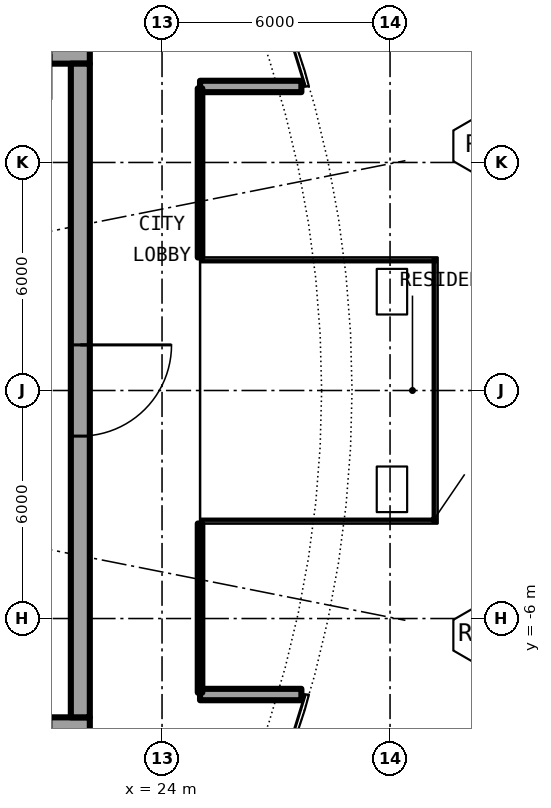
"""IFC4 building model, lengths in metres.
Left out: names, types, materials, properties, quantities, classifications, styles, units other than length and angle.
Written with IfcOpenShell. Run it as: python <this file> out.ifc"""

import sys

from ifc_helpers import new_model, si_unit, direction, frame, frame_2d, origin, place, context, subcontext, project, spatial, rectangle, extrude, element, fill, save


model = new_model("IFC4")
c1 = context("Model", 3, precision=1e-05, world=origin(), true_north=direction((0.0, 1.0)))
c2 = subcontext(c1, "Body", "Model", "MODEL_VIEW")
j1 = project(units=[si_unit("LENGTHUNIT", "METRE"), si_unit("PLANEANGLEUNIT", "RADIAN")], contexts=[c1])
p1 = place(None, origin())
s1 = spatial("IfcSite", under=j1, at=p1, CompositionType="ELEMENT")
p2 = place(p1, origin())
s2 = spatial("IfcBuilding", under=s1, at=p2, CompositionType="ELEMENT")
p3 = place(p2, frame((0.0, 0.0, 179.9)))
s3 = spatial("IfcBuildingStorey", under=s2, at=p3, CompositionType="ELEMENT", Elevation=179.9)
for number, where, z_axis, x_axis in (
    (1, (25.0, 8.0, 0.0), (0.0, 0.0, 1.0), (1.0, 0.0, 0.0)),
    (2, (25.0, -8.0, 0.0), (0.0, 0.0, 1.0), (1.0, 0.0, 0.0)),
):
    element("IfcWall", number, at=place(p3, frame(where, z_axis=z_axis, x_axis=x_axis)), inside=s3, PredefinedType="SOLIDWALL", context=c2, shape_type="SweptSolid", body=[
        extrude(rectangle(XDim=2.667, YDim=0.3, at=frame_2d((1.333, 0.0))), origin(), (0.0, 0.0, 1.0), 5.7),
    ])
p4 = place(p3, frame((22.1, 8.85, 0.0), z_axis=(0.0, 0.0, 1.0), x_axis=(-1.0, 0.0, 0.0)))
e3 = element("IfcWall", 3, at=p4, inside=s3, PredefinedType="SHEAR", context=c2, shape_type="SweptSolid", body=[
    extrude(rectangle(XDim=13.6, YDim=0.5, at=frame_2d((6.8, 0.0))), origin(), (0.0, 0.0, 1.0), 6.1),
])
p5 = place(p4, frame((1.025, 0.0, 0.0)))
e4 = element("IfcOpeningElement", 4, at=p5, cuts=e3, PredefinedType="OPENING", context=c2, shape_type="SweptSolid", body=[
    extrude(rectangle(XDim=1.2, YDim=2.3, at=frame_2d((0.6, 1.15))), frame((0.0, 0.26, 0.0), z_axis=(0.0, -1.0, 0.0), x_axis=(1.0, 0.0, 0.0)), (0.0, 0.0, 1.0), 0.52),
])
p6 = place(p3, frame((8.5, -8.85, 0.0), z_axis=(0.0, 0.0, 1.0), x_axis=(1.0, 0.0, 0.0)))
e5 = element("IfcWall", 5, at=p6, inside=s3, PredefinedType="SHEAR", context=c2, shape_type="SweptSolid", body=[
    extrude(rectangle(XDim=13.6, YDim=0.5, at=frame_2d((6.8, 0.0))), origin(), (0.0, 0.0, 1.0), 6.1),
])
p7 = place(p6, frame((11.375, 0.0, 0.0)))
e6 = element("IfcOpeningElement", 6, at=p7, cuts=e5, PredefinedType="OPENING", context=c2, shape_type="SweptSolid", body=[
    extrude(rectangle(XDim=1.2, YDim=2.3, at=frame_2d((0.6, 1.15))), frame((0.0, 0.26, 0.0), z_axis=(0.0, -1.0, 0.0), x_axis=(1.0, 0.0, 0.0)), (0.0, 0.0, 1.0), 0.52),
])
p8 = place(p3, frame((21.85, 8.6, 0.0), z_axis=(0.0, 0.0, 1.0), x_axis=(0.0, -1.0, 0.0)))
e7 = element("IfcWall", 7, at=p8, inside=s3, PredefinedType="SHEAR", context=c2, shape_type="SweptSolid", body=[
    extrude(rectangle(XDim=17.2, YDim=0.5, at=frame_2d((8.6, 0.0))), origin(), (0.0, 0.0, 1.0), 6.1),
])
p9 = place(p8, frame((7.4, 0.0, 0.0)))
e8 = element("IfcOpeningElement", 8, at=p9, cuts=e7, PredefinedType="OPENING", context=c2, shape_type="SweptSolid", body=[
    extrude(rectangle(XDim=2.4, YDim=2.3, at=frame_2d((1.2, 1.15))), frame((0.0, 0.26, 0.0), z_axis=(0.0, -1.0, 0.0), x_axis=(1.0, 0.0, 0.0)), (0.0, 0.0, 1.0), 0.52),
])
p10 = place(p3, frame((25.0, -3.5, 0.0), z_axis=(0.0, 0.0, 1.0), x_axis=(0.0, -1.0, 0.0)))
e9 = element("IfcWall", 9, at=p10, inside=s3, PredefinedType="PARTITIONING", context=c2, shape_type="SweptSolid", body=[
    extrude(rectangle(XDim=4.45, YDim=0.12, at=frame_2d((2.225, 0.0))), origin(), (0.0, 0.0, 1.0), 5.7),
])
p11 = place(p10, frame((0.4, 0.0, 0.1)))
e10 = element("IfcOpeningElement", 10, at=p11, cuts=e9, PredefinedType="OPENING", context=c2, shape_type="SweptSolid", body=[
    extrude(rectangle(XDim=3.6, YDim=5.35, at=frame_2d((1.8, 2.675))), frame((0.0, 0.07, 0.0), z_axis=(0.0, -1.0, 0.0), x_axis=(1.0, 0.0, 0.0)), (0.0, 0.0, 1.0), 0.14),
])
p12 = place(p3, frame((25.0, 3.5, 0.0), z_axis=(0.0, 0.0, 1.0), x_axis=(0.0, 1.0, 0.0)))
e11 = element("IfcWall", 11, at=p12, inside=s3, PredefinedType="PARTITIONING", context=c2, shape_type="SweptSolid", body=[
    extrude(rectangle(XDim=4.45, YDim=0.12, at=frame_2d((2.225, 0.0))), origin(), (0.0, 0.0, 1.0), 5.7),
])
p13 = place(p12, frame((0.4, 0.0, 0.1)))
e12 = element("IfcOpeningElement", 12, at=p13, cuts=e11, PredefinedType="OPENING", context=c2, shape_type="SweptSolid", body=[
    extrude(rectangle(XDim=3.6, YDim=5.35, at=frame_2d((1.8, 2.675))), frame((0.0, 0.07, 0.0), z_axis=(0.0, -1.0, 0.0), x_axis=(1.0, 0.0, 0.0)), (0.0, 0.0, 1.0), 0.14),
])
p14 = place(p9, origin())
e13 = element("IfcDoor", 13, at=p14, inside=s3, OperationType="SINGLE_SWING_LEFT", PredefinedType="DOOR", context=c2, shape_type="SweptSolid", body=[
    extrude(rectangle(XDim=2.4, YDim=2.3, at=frame_2d((1.2, 1.15))), frame((0.0, 0.025, 0.0), z_axis=(0.0, -1.0, 0.0), x_axis=(1.0, 0.0, 0.0)), (0.0, 0.0, 1.0), 0.05),
])
fill(e8, e13)
p15 = place(p11, origin())
e14 = element("IfcWindow", 14, at=p15, inside=s3, PartitioningType="SINGLE_PANEL", PredefinedType="WINDOW", context=c2, shape_type="SweptSolid", body=[
    extrude(rectangle(XDim=3.6, YDim=5.35, at=frame_2d((1.8, 2.675))), frame((0.0, 0.03, 0.0), z_axis=(0.0, -1.0, 0.0), x_axis=(1.0, 0.0, 0.0)), (0.0, 0.0, 1.0), 0.06),
])
fill(e10, e14)
p16 = place(p13, origin())
e15 = element("IfcWindow", 15, at=p16, inside=s3, PartitioningType="SINGLE_PANEL", PredefinedType="WINDOW", context=c2, shape_type="SweptSolid", body=[
    extrude(rectangle(XDim=3.6, YDim=5.35, at=frame_2d((1.8, 2.675))), frame((0.0, 0.03, 0.0), z_axis=(0.0, -1.0, 0.0), x_axis=(1.0, 0.0, 0.0)), (0.0, 0.0, 1.0), 0.06),
])
fill(e12, e15)
save(model, sys.argv[1])
